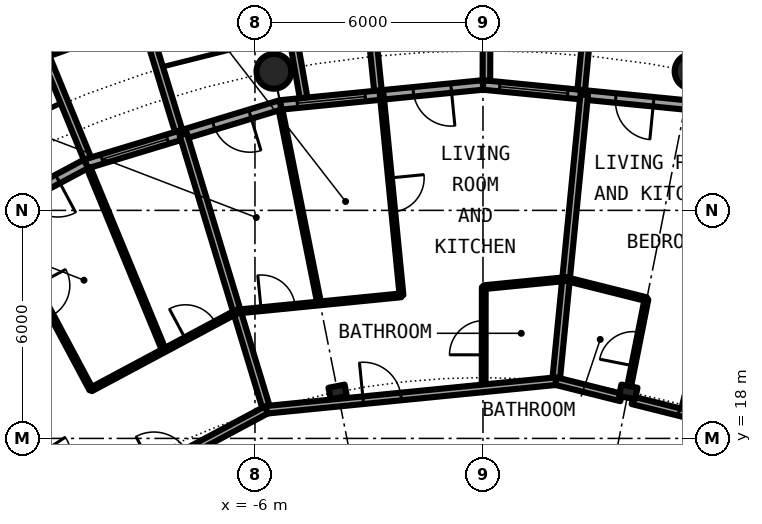
"""IFC4 building model, lengths in metres.
Left out: names, types, materials, properties, quantities, classifications, styles, units other than length and angle.
Written with IfcOpenShell. Run it as: python <this file> out.ifc"""

import sys

from ifc_helpers import new_model, si_unit, direction, frame, frame_2d, origin, origin_2d, place, context, subcontext, project, spatial, rectangle, circle, hollow_circle, i_section, extrude, element, fill, save


model = new_model("IFC4")
c1 = context("Model", 3, precision=1e-05, world=origin(), true_north=direction((0.0, 1.0)))
c2 = subcontext(c1, "Body", "Model", "MODEL_VIEW")
j1 = project(units=[si_unit("LENGTHUNIT", "METRE"), si_unit("PLANEANGLEUNIT", "RADIAN")], contexts=[c1])
p1 = place(None, origin())
s1 = spatial("IfcSite", under=j1, at=p1, CompositionType="ELEMENT")
p2 = place(p1, origin())
s2 = spatial("IfcBuilding", under=s1, at=p2, CompositionType="ELEMENT")
p3 = place(p2, frame((0.0, 0.0, 123.85)))
s3 = spatial("IfcBuildingStorey", under=s2, at=p3, CompositionType="ELEMENT", Elevation=123.85)
for number, where, z_axis, x_axis in (
    (1, (5.501, 27.658, 0.0), (0.0, 0.0, 1.0), (1.0, 0.0, 0.0)),
    (2, (-5.501, 27.658, 0.0), (0.0, 0.0, 1.0), (1.0, 0.0, 0.0)),
):
    element("IfcColumn", number, at=place(p3, frame(where, z_axis=z_axis, x_axis=x_axis)), inside=s3, PredefinedType="COLUMN", context=c2, shape_type="SweptSolid", body=[
        extrude(hollow_circle(Radius=0.457, WallThickness=0.04, at=origin_2d()), origin(), (0.0, 0.0, 1.0), 3.05),
    ])
for number, where, z_axis, x_axis in (
    (3, (3.824, 19.223, 0.0), (0.0, 0.0, 1.0), (0.195, 0.981, 0.0)),
    (4, (-3.824, 19.223, 0.0), (0.0, 0.0, 1.0), (-0.195, 0.981, 0.0)),
):
    element("IfcColumn", number, at=place(p3, frame(where, z_axis=z_axis, x_axis=x_axis)), inside=s3, PredefinedType="COLUMN", context=c2, shape_type="SweptSolid", body=[
        extrude(i_section(OverallWidth=0.307, OverallDepth=0.432, WebThickness=0.021, FlangeThickness=0.04, FilletRadius=0.027, at=origin_2d()), origin(), (0.0, 0.0, 1.0), 3.05),
    ])
p4 = place(p3, frame((5.326, 26.775, 0.0), z_axis=(0.0, 0.0, 1.0), x_axis=(-0.995173996315, 0.098126026407, 0.0)))
e5 = element("IfcWall", 5, at=p4, inside=s3, PredefinedType="SOLIDWALL", context=c2, shape_type="SweptSolid", body=[
    extrude(rectangle(XDim=5.352, YDim=0.25, at=frame_2d((2.676, 0.0))), origin(), (0.0, 0.0, 1.0), 2.7),
])
p5 = place(p4, frame((0.841, 0.0, 0.0)))
e6 = element("IfcOpeningElement", 6, at=p5, cuts=e5, PredefinedType="OPENING", context=c2, shape_type="SweptSolid", body=[
    extrude(rectangle(XDim=1.0, YDim=2.2, at=frame_2d((0.5, 1.1))), frame((0.0, 0.135, 0.0), z_axis=(0.0, -1.0, 0.0), x_axis=(1.0, 0.0, 0.0)), (0.0, 0.0, 1.0), 0.27),
])
p6 = place(p4, frame((3.111, 0.0, 0.3)))
e7 = element("IfcOpeningElement", 7, at=p6, cuts=e5, PredefinedType="OPENING", context=c2, shape_type="SweptSolid", body=[
    extrude(rectangle(XDim=1.8, YDim=2.1, at=frame_2d((0.9, 1.05))), frame((0.0, 0.135, 0.0), z_axis=(0.0, -1.0, 0.0), x_axis=(1.0, 0.0, 0.0)), (0.0, 0.0, 1.0), 0.27),
])
p7 = place(p3, frame((2.586, 27.171, -0.03), z_axis=(0.0, 0.0, 1.0), x_axis=(0.094548432284, 0.995520262954, 0.0)))
e8 = element("IfcWall", 8, at=p7, inside=s3, PredefinedType="SOLIDWALL", context=c2, shape_type="SweptSolid", body=[
    extrude(rectangle(XDim=3.006, YDim=0.2, at=frame_2d((1.503, 0.0))), origin(), (0.0, 0.0, 1.0), 2.73),
])
p8 = place(p3, frame((0.09, 27.417, -0.03), z_axis=(0.0, 0.0, 1.0), x_axis=(0.00347308367, 0.999993968827, 0.0)))
e9 = element("IfcWall", 9, at=p8, inside=s3, PredefinedType="SOLIDWALL", context=c2, shape_type="SweptSolid", body=[
    extrude(rectangle(XDim=2.882, YDim=0.2, at=frame_2d((1.441, 0.0))), origin(), (0.0, 0.0, 1.0), 2.73),
])
p9 = place(p3, frame((0.0, 27.3, 0.0), z_axis=(0.0, 0.0, 1.0), x_axis=(-0.995173996315, -0.098126026407, 0.0)))
e10 = element("IfcWall", 10, at=p9, inside=s3, PredefinedType="SOLIDWALL", context=c2, shape_type="SweptSolid", body=[
    extrude(rectangle(XDim=5.352, YDim=0.25, at=frame_2d((2.676, 0.0))), origin(), (0.0, 0.0, 1.0), 2.7),
])
p10 = place(p9, frame((0.841, 0.0, 0.0)))
e11 = element("IfcOpeningElement", 11, at=p10, cuts=e10, PredefinedType="OPENING", context=c2, shape_type="SweptSolid", body=[
    extrude(rectangle(XDim=1.0, YDim=2.2, at=frame_2d((0.5, 1.1))), frame((0.0, 0.135, 0.0), z_axis=(0.0, -1.0, 0.0), x_axis=(1.0, 0.0, 0.0)), (0.0, 0.0, 1.0), 0.27),
])
p11 = place(p9, frame((3.111, 0.0, 0.3)))
e12 = element("IfcOpeningElement", 12, at=p11, cuts=e10, PredefinedType="OPENING", context=c2, shape_type="SweptSolid", body=[
    extrude(rectangle(XDim=1.8, YDim=2.1, at=frame_2d((0.9, 1.05))), frame((0.0, 0.135, 0.0), z_axis=(0.0, -1.0, 0.0), x_axis=(1.0, 0.0, 0.0)), (0.0, 0.0, 1.0), 0.27),
])
p12 = place(p3, frame((-2.764, 27.153, -0.03), z_axis=(0.0, 0.0, 1.0), x_axis=(-0.101505487237, 0.994834979311, 0.0)))
e13 = element("IfcWall", 13, at=p12, inside=s3, PredefinedType="SOLIDWALL", context=c2, shape_type="SweptSolid", body=[
    extrude(rectangle(XDim=3.007, YDim=0.2, at=frame_2d((1.503, 0.0))), origin(), (0.0, 0.0, 1.0), 2.73),
])
p13 = place(p3, frame((-4.72, 26.961, -0.03), z_axis=(0.0, 0.0, 1.0), x_axis=(-0.172463232037, 0.98501595601, 0.0)))
e14 = element("IfcWall", 14, at=p13, inside=s3, PredefinedType="SOLIDWALL", context=c2, shape_type="SweptSolid", body=[
    extrude(rectangle(XDim=2.929, YDim=0.2, at=frame_2d((1.464, 0.0))), origin(), (0.0, 0.0, 1.0), 2.73),
])
p14 = place(p3, frame((-5.326, 26.775, 0.0), z_axis=(0.0, 0.0, 1.0), x_axis=(-0.956965678721, -0.290201119486, 0.0)))
e15 = element("IfcWall", 15, at=p14, inside=s3, PredefinedType="SOLIDWALL", context=c2, shape_type="SweptSolid", body=[
    extrude(rectangle(XDim=5.351, YDim=0.25, at=frame_2d((2.676, 0.0))), origin(), (0.0, 0.0, 1.0), 2.7),
])
p15 = place(p14, frame((0.841, 0.0, 0.0)))
e16 = element("IfcOpeningElement", 16, at=p15, cuts=e15, PredefinedType="OPENING", context=c2, shape_type="SweptSolid", body=[
    extrude(rectangle(XDim=1.0, YDim=2.2, at=frame_2d((0.5, 1.1))), frame((0.0, 0.135, 0.0), z_axis=(0.0, -1.0, 0.0), x_axis=(1.0, 0.0, 0.0)), (0.0, 0.0, 1.0), 0.27),
])
p16 = place(p14, frame((3.111, 0.0, 0.3)))
e17 = element("IfcOpeningElement", 17, at=p16, cuts=e15, PredefinedType="OPENING", context=c2, shape_type="SweptSolid", body=[
    extrude(rectangle(XDim=1.8, YDim=2.1, at=frame_2d((0.9, 1.05))), frame((0.0, 0.135, 0.0), z_axis=(0.0, -1.0, 0.0), x_axis=(1.0, 0.0, 0.0)), (0.0, 0.0, 1.0), 0.27),
])
p17 = place(p3, frame((-8.82, 29.093, -0.03), z_axis=(0.0, 0.0, 1.0), x_axis=(-0.941461077774, -0.337121697664, 0.0)))
e18 = element("IfcWall", 18, at=p17, inside=s3, PredefinedType="SOLIDWALL", context=c2, shape_type="SweptSolid", body=[
    extrude(rectangle(XDim=2.993, YDim=0.2, at=frame_2d((1.497, 0.0))), origin(), (0.0, 0.0, 1.0), 2.73),
])
p18 = place(p17, frame((0.457, 0.0, 0.33)))
e19 = element("IfcOpeningElement", 19, at=p18, cuts=e18, PredefinedType="OPENING", context=c2, shape_type="SweptSolid", body=[
    extrude(circle(Radius=1.04, at=frame_2d((1.04, 1.04))), frame((0.0, 0.11, 0.0), z_axis=(0.0, -1.0, 0.0), x_axis=(1.0, 0.0, 0.0)), (0.0, 0.0, 1.0), 0.22),
])
p19 = place(p3, frame((-8.009, 26.092, -0.03), z_axis=(0.0, 0.0, 1.0), x_axis=(-0.293406695073, 0.955987715029, 0.0)))
e20 = element("IfcWall", 20, at=p19, inside=s3, PredefinedType="SOLIDWALL", context=c2, shape_type="SweptSolid", body=[
    extrude(rectangle(XDim=3.006, YDim=0.2, at=frame_2d((1.503, 0.0))), origin(), (0.0, 0.0, 1.0), 2.73),
])
p20 = place(p3, frame((-10.409, 25.364, -0.03), z_axis=(0.0, 0.0, 1.0), x_axis=(-0.379509886562, 0.925187681501, 0.0)))
e21 = element("IfcWall", 21, at=p20, inside=s3, PredefinedType="SOLIDWALL", context=c2, shape_type="SweptSolid", body=[
    extrude(rectangle(XDim=2.883, YDim=0.2, at=frame_2d((1.441, 0.0))), origin(), (0.0, 0.0, 1.0), 2.73),
])
p21 = place(p3, frame((-10.447, 25.222, 0.0), z_axis=(0.0, 0.0, 1.0), x_axis=(-0.881915646801, -0.471407246368, 0.0)))
e22 = element("IfcWall", 22, at=p21, inside=s3, PredefinedType="SOLIDWALL", context=c2, shape_type="SweptSolid", body=[
    extrude(rectangle(XDim=5.352, YDim=0.25, at=frame_2d((2.676, 0.0))), origin(), (0.0, 0.0, 1.0), 2.7),
])
p22 = place(p21, frame((0.841, 0.0, 0.0)))
e23 = element("IfcOpeningElement", 23, at=p22, cuts=e22, PredefinedType="OPENING", context=c2, shape_type="SweptSolid", body=[
    extrude(rectangle(XDim=1.0, YDim=2.2, at=frame_2d((0.5, 1.1))), frame((0.0, 0.135, 0.0), z_axis=(0.0, -1.0, 0.0), x_axis=(1.0, 0.0, 0.0)), (0.0, 0.0, 1.0), 0.27),
])
p23 = place(p21, frame((3.111, 0.0, 0.3)))
e24 = element("IfcOpeningElement", 24, at=p23, cuts=e22, PredefinedType="OPENING", context=c2, shape_type="SweptSolid", body=[
    extrude(rectangle(XDim=1.8, YDim=2.1, at=frame_2d((0.9, 1.05))), frame((0.0, 0.135, 0.0), z_axis=(0.0, -1.0, 0.0), x_axis=(1.0, 0.0, 0.0)), (0.0, 0.0, 1.0), 0.27),
])
p24 = place(p3, frame((-7.887, 26.005, 0.0), z_axis=(0.0, 0.0, 1.0), x_axis=(0.29005838641, -0.957008951094, 0.0)))
e25 = element("IfcWall", 25, at=p24, inside=s3, PredefinedType="PARTITIONING", context=c2, shape_type="SweptSolid", body=[
    extrude(rectangle(XDim=7.574, YDim=0.2, at=frame_2d((3.787, 0.0))), origin(), (0.0, 0.0, 1.0), 2.7),
])
p25 = place(p3, frame((-12.81, 23.966, 0.0), z_axis=(0.0, 0.0, 1.0), x_axis=(0.47140999111, -0.881914179658, 0.0)))
e26 = element("IfcWall", 26, at=p25, inside=s3, PredefinedType="PARTITIONING", context=c2, shape_type="SweptSolid", body=[
    extrude(rectangle(XDim=5.303, YDim=0.1, at=frame_2d((2.652, 0.0))), origin(), (0.0, 0.0, 1.0), 2.7),
])
p26 = place(p25, frame((2.202, 0.0, 0.0)))
e27 = element("IfcOpeningElement", 27, at=p26, cuts=e26, PredefinedType="OPENING", context=c2, shape_type="SweptSolid", body=[
    extrude(rectangle(XDim=0.9, YDim=2.3, at=frame_2d((0.45, 1.15))), frame((0.0, 0.06, 0.0), z_axis=(0.0, -1.0, 0.0), x_axis=(1.0, 0.0, 0.0)), (0.0, 0.0, 1.0), 0.12),
])
p27 = place(p3, frame((-12.229, 18.264, 0.0), z_axis=(0.0, 0.0, 1.0), x_axis=(0.556469477731, -0.830868052313, 0.0)))
e28 = element("IfcWall", 28, at=p27, inside=s3, PredefinedType="PARTITIONING", context=c2, shape_type="SweptSolid", body=[
    extrude(rectangle(XDim=2.164, YDim=0.1, at=frame_2d((1.082, 0.0))), origin(), (0.0, 0.0, 1.0), 2.7),
])
p28 = place(p27, frame((0.881, 0.0, 0.0)))
e29 = element("IfcOpeningElement", 29, at=p28, cuts=e28, PredefinedType="OPENING", context=c2, shape_type="SweptSolid", body=[
    extrude(rectangle(XDim=0.9, YDim=2.3, at=frame_2d((0.45, 1.15))), frame((0.0, 0.06, 0.0), z_axis=(0.0, -1.0, 0.0), x_axis=(1.0, 0.0, 0.0)), (0.0, 0.0, 1.0), 0.12),
])
p29 = place(p3, frame((-10.375, 25.116, 0.0), z_axis=(0.0, 0.0, 1.0), x_axis=(0.381673756215, -0.924297107978, 0.0)))
e30 = element("IfcWall", 30, at=p29, inside=s3, PredefinedType="PARTITIONING", context=c2, shape_type="SweptSolid", body=[
    extrude(rectangle(XDim=5.195, YDim=0.1, at=frame_2d((2.598, 0.0))), origin(), (0.0, 0.0, 1.0), 2.7),
])
p30 = place(p3, frame((-5.327, 26.648, 0.0), z_axis=(0.0, 0.0, 1.0), x_axis=(0.195899255693, -0.980624026638, 0.0)))
e31 = element("IfcWall", 31, at=p30, inside=s3, PredefinedType="PARTITIONING", context=c2, shape_type="SweptSolid", body=[
    extrude(rectangle(XDim=5.196, YDim=0.1, at=frame_2d((2.598, 0.0))), origin(), (0.0, 0.0, 1.0), 2.7),
])
p31 = place(p3, frame((-2.664, 27.044, 0.0), z_axis=(0.0, 0.0, 1.0), x_axis=(0.098054199821, -0.995181075934, 0.0)))
e32 = element("IfcWall", 32, at=p31, inside=s3, PredefinedType="PARTITIONING", context=c2, shape_type="SweptSolid", body=[
    extrude(rectangle(XDim=5.303, YDim=0.1, at=frame_2d((2.652, 0.0))), origin(), (0.0, 0.0, 1.0), 2.7),
])
p32 = place(p31, frame((2.202, 0.0, 0.0)))
e33 = element("IfcOpeningElement", 33, at=p32, cuts=e32, PredefinedType="OPENING", context=c2, shape_type="SweptSolid", body=[
    extrude(rectangle(XDim=0.9, YDim=2.3, at=frame_2d((0.45, 1.15))), frame((0.0, 0.06, 0.0), z_axis=(0.0, -1.0, 0.0), x_axis=(1.0, 0.0, 0.0)), (0.0, 0.0, 1.0), 0.12),
])
p33 = place(p3, frame((0.018, 19.318, 0.0), z_axis=(0.0, 0.0, 1.0), x_axis=(0.001101017775, 0.99999939388, 0.0)))
e34 = element("IfcWall", 34, at=p33, inside=s3, PredefinedType="PARTITIONING", context=c2, shape_type="SweptSolid", body=[
    extrude(rectangle(XDim=2.661, YDim=0.1, at=frame_2d((1.331, 0.0))), origin(), (0.0, 0.0, 1.0), 2.7),
])
p34 = place(p33, frame((0.881, 0.0, 0.0)))
e35 = element("IfcOpeningElement", 35, at=p34, cuts=e34, PredefinedType="OPENING", context=c2, shape_type="SweptSolid", body=[
    extrude(rectangle(XDim=0.9, YDim=2.3, at=frame_2d((0.45, 1.15))), frame((0.0, 0.06, 0.0), z_axis=(0.0, -1.0, 0.0), x_axis=(1.0, 0.0, 0.0)), (0.0, 0.0, 1.0), 0.12),
])
p35 = place(p3, frame((1.921, 19.506, 0.0), z_axis=(0.0, 0.0, 1.0), x_axis=(0.098115395479, 0.995175044487, 0.0)))
e36 = element("IfcWall", 36, at=p35, inside=s3, PredefinedType="PARTITIONING", context=c2, shape_type="SweptSolid", body=[
    extrude(rectangle(XDim=7.574, YDim=0.2, at=frame_2d((3.787, 0.0))), origin(), (0.0, 0.0, 1.0), 2.7),
])
p36 = place(p3, frame((3.86, 19.436, 0.0), z_axis=(0.0, 0.0, 1.0), x_axis=(0.194627049372, 0.98087731733, 0.0)))
e37 = element("IfcWall", 37, at=p36, inside=s3, PredefinedType="PARTITIONING", context=c2, shape_type="SweptSolid", body=[
    extrude(rectangle(XDim=2.271, YDim=0.1, at=frame_2d((1.135, 0.0))), origin(), (0.0, 0.0, 1.0), 2.7),
])
p37 = place(p36, frame((0.483, 0.0, 0.0)))
e38 = element("IfcOpeningElement", 38, at=p37, cuts=e37, PredefinedType="OPENING", context=c2, shape_type="SweptSolid", body=[
    extrude(rectangle(XDim=0.9, YDim=2.3, at=frame_2d((0.45, 1.15))), frame((0.0, 0.06, 0.0), z_axis=(0.0, -1.0, 0.0), x_axis=(1.0, 0.0, 0.0)), (0.0, 0.0, 1.0), 0.12),
])
p38 = place(p3, frame((-12.434, 15.151, 0.0), z_axis=(0.0, 0.0, 1.0), x_axis=(0.8819312112, 0.471378127104, 0.0)))
e39 = element("IfcWall", 39, at=p38, inside=s3, PredefinedType="PARTITIONING", context=c2, shape_type="SweptSolid", body=[
    extrude(rectangle(XDim=7.65, YDim=0.2, at=frame_2d((3.825, 0.0))), origin(), (0.0, 0.0, 1.0), 2.39),
])
p39 = place(p38, frame((4.279, 0.0, 0.0)))
e40 = element("IfcOpeningElement", 40, at=p39, cuts=e39, PredefinedType="OPENING", context=c2, shape_type="SweptSolid", body=[
    extrude(rectangle(XDim=1.0, YDim=2.3, at=frame_2d((0.5, 1.15))), frame((0.0, 0.11, 0.0), z_axis=(0.0, -1.0, 0.0), x_axis=(1.0, 0.0, 0.0)), (0.0, 0.0, 1.0), 0.22),
])
p40 = place(p3, frame((-5.696, 18.753, 0.0), z_axis=(0.0, 0.0, 1.0), x_axis=(0.995146797279, 0.098401483048, 0.0)))
e41 = element("IfcWall", 41, at=p40, inside=s3, PredefinedType="PARTITIONING", context=c2, shape_type="SweptSolid", body=[
    extrude(rectangle(XDim=7.654, YDim=0.2, at=frame_2d((3.827, 0.0))), origin(), (0.0, 0.0, 1.0), 2.39),
])
p41 = place(p40, frame((2.556, 0.0, 0.0)))
e42 = element("IfcOpeningElement", 42, at=p41, cuts=e41, PredefinedType="OPENING", context=c2, shape_type="SweptSolid", body=[
    extrude(rectangle(XDim=1.0, YDim=2.3, at=frame_2d((0.5, 1.15))), frame((0.0, 0.11, 0.0), z_axis=(0.0, -1.0, 0.0), x_axis=(1.0, 0.0, 0.0)), (0.0, 0.0, 1.0), 0.22),
])
p42 = place(p3, frame((1.921, 19.506, 0.0), z_axis=(0.0, 0.0, 1.0), x_axis=(0.97002068022, -0.243022385689, 0.0)))
e43 = element("IfcWall", 43, at=p42, inside=s3, PredefinedType="PARTITIONING", context=c2, shape_type="SweptSolid", body=[
    extrude(rectangle(XDim=1.77, YDim=0.2, at=frame_2d((0.885, 0.0))), origin(), (0.0, 0.0, 1.0), 2.39),
])
p43 = place(p3, frame((3.936, 19.001, 0.0), z_axis=(0.0, 0.0, 1.0), x_axis=(0.970025155677, -0.243004521262, 0.0)))
e44 = element("IfcWall", 44, at=p43, inside=s3, PredefinedType="PARTITIONING", context=c2, shape_type="SweptSolid", body=[
    extrude(rectangle(XDim=3.675, YDim=0.2, at=frame_2d((1.837, 0.0))), origin(), (0.0, 0.0, 1.0), 2.39),
])
p44 = place(p43, frame((1.258, 0.0, 0.0)))
e45 = element("IfcOpeningElement", 45, at=p44, cuts=e44, PredefinedType="OPENING", context=c2, shape_type="SweptSolid", body=[
    extrude(rectangle(XDim=1.0, YDim=2.3, at=frame_2d((0.5, 1.15))), frame((0.0, 0.11, 0.0), z_axis=(0.0, -1.0, 0.0), x_axis=(1.0, 0.0, 0.0)), (0.0, 0.0, 1.0), 0.22),
])
p45 = place(p3, frame((-10.312, 19.288, 0.0), z_axis=(0.0, 0.0, 1.0), x_axis=(0.881932070463, 0.471376519451, 0.0)))
e46 = element("IfcWall", 46, at=p45, inside=s3, PredefinedType="PARTITIONING", context=c2, shape_type="SweptSolid", body=[
    extrude(rectangle(XDim=4.355, YDim=0.1, at=frame_2d((2.178, 0.0))), origin(), (0.0, 0.0, 1.0), 2.7),
])
p46 = place(p45, frame((2.816, 0.0, 0.0)))
e47 = element("IfcOpeningElement", 47, at=p46, cuts=e46, PredefinedType="OPENING", context=c2, shape_type="SweptSolid", body=[
    extrude(rectangle(XDim=0.9, YDim=2.3, at=frame_2d((0.45, 1.15))), frame((0.0, 0.06, 0.0), z_axis=(0.0, -1.0, 0.0), x_axis=(1.0, 0.0, 0.0)), (0.0, 0.0, 1.0), 0.12),
])
p47 = place(p3, frame((-6.482, 21.336, 0.0), z_axis=(0.0, 0.0, 1.0), x_axis=(0.995148257168, 0.098386717885, 0.0)))
e48 = element("IfcWall", 48, at=p47, inside=s3, PredefinedType="PARTITIONING", context=c2, shape_type="SweptSolid", body=[
    extrude(rectangle(XDim=4.35, YDim=0.1, at=frame_2d((2.175, 0.0))), origin(), (0.0, 0.0, 1.0), 2.7),
])
p48 = place(p47, frame((0.647, 0.0, 0.0)))
e49 = element("IfcOpeningElement", 49, at=p48, cuts=e48, PredefinedType="OPENING", context=c2, shape_type="SweptSolid", body=[
    extrude(rectangle(XDim=0.9, YDim=2.3, at=frame_2d((0.45, 1.15))), frame((0.0, 0.06, 0.0), z_axis=(0.0, -1.0, 0.0), x_axis=(1.0, 0.0, 0.0)), (0.0, 0.0, 1.0), 0.12),
])
p49 = place(p3, frame((0.021, 21.979, 0.0), z_axis=(0.0, 0.0, 1.0), x_axis=(0.995145478845, 0.098414815623, 0.0)))
e50 = element("IfcWall", 50, at=p49, inside=s3, PredefinedType="PARTITIONING", context=c2, shape_type="SweptSolid", body=[
    extrude(rectangle(XDim=2.176, YDim=0.1, at=frame_2d((1.088, 0.0))), origin(), (0.0, 0.0, 1.0), 2.7),
])
p50 = place(p3, frame((2.186, 22.193, 0.0), z_axis=(0.0, 0.0, 1.0), x_axis=(0.97003047456, -0.242983288366, 0.0)))
e51 = element("IfcWall", 51, at=p50, inside=s3, PredefinedType="PARTITIONING", context=c2, shape_type="SweptSolid", body=[
    extrude(rectangle(XDim=2.181, YDim=0.1, at=frame_2d((1.091, 0.0))), origin(), (0.0, 0.0, 1.0), 2.7),
])
p51 = place(p5, origin())
e52 = element("IfcDoor", 52, at=p51, inside=s3, OperationType="SINGLE_SWING_LEFT", PredefinedType="DOOR", context=c2, shape_type="SweptSolid", body=[
    extrude(rectangle(XDim=1.0, YDim=2.2, at=frame_2d((0.5, 1.1))), frame((0.0, 0.025, 0.0), z_axis=(0.0, -1.0, 0.0), x_axis=(1.0, 0.0, 0.0)), (0.0, 0.0, 1.0), 0.05),
])
fill(e6, e52)
p52 = place(p6, origin())
e53 = element("IfcWindow", 53, at=p52, inside=s3, PartitioningType="SINGLE_PANEL", PredefinedType="WINDOW", context=c2, shape_type="SweptSolid", body=[
    extrude(rectangle(XDim=1.8, YDim=2.1, at=frame_2d((0.9, 1.05))), frame((0.0, 0.03, 0.0), z_axis=(0.0, -1.0, 0.0), x_axis=(1.0, 0.0, 0.0)), (0.0, 0.0, 1.0), 0.06),
])
fill(e7, e53)
p53 = place(p10, origin())
e54 = element("IfcDoor", 54, at=p53, inside=s3, OperationType="SINGLE_SWING_LEFT", PredefinedType="DOOR", context=c2, shape_type="SweptSolid", body=[
    extrude(rectangle(XDim=1.0, YDim=2.2, at=frame_2d((0.5, 1.1))), frame((0.0, 0.025, 0.0), z_axis=(0.0, -1.0, 0.0), x_axis=(1.0, 0.0, 0.0)), (0.0, 0.0, 1.0), 0.05),
])
fill(e11, e54)
p54 = place(p11, origin())
e55 = element("IfcWindow", 55, at=p54, inside=s3, PartitioningType="SINGLE_PANEL", PredefinedType="WINDOW", context=c2, shape_type="SweptSolid", body=[
    extrude(rectangle(XDim=1.8, YDim=2.1, at=frame_2d((0.9, 1.05))), frame((0.0, 0.03, 0.0), z_axis=(0.0, -1.0, 0.0), x_axis=(1.0, 0.0, 0.0)), (0.0, 0.0, 1.0), 0.06),
])
fill(e12, e55)
p55 = place(p15, origin())
e56 = element("IfcDoor", 56, at=p55, inside=s3, OperationType="SINGLE_SWING_LEFT", PredefinedType="DOOR", context=c2, shape_type="SweptSolid", body=[
    extrude(rectangle(XDim=1.0, YDim=2.2, at=frame_2d((0.5, 1.1))), frame((0.0, 0.025, 0.0), z_axis=(0.0, -1.0, 0.0), x_axis=(1.0, 0.0, 0.0)), (0.0, 0.0, 1.0), 0.05),
])
fill(e16, e56)
p56 = place(p16, origin())
e57 = element("IfcWindow", 57, at=p56, inside=s3, PartitioningType="SINGLE_PANEL", PredefinedType="WINDOW", context=c2, shape_type="SweptSolid", body=[
    extrude(rectangle(XDim=1.8, YDim=2.1, at=frame_2d((0.9, 1.05))), frame((0.0, 0.03, 0.0), z_axis=(0.0, -1.0, 0.0), x_axis=(1.0, 0.0, 0.0)), (0.0, 0.0, 1.0), 0.06),
])
fill(e17, e57)
p57 = place(p22, origin())
e58 = element("IfcDoor", 58, at=p57, inside=s3, OperationType="SINGLE_SWING_LEFT", PredefinedType="DOOR", context=c2, shape_type="SweptSolid", body=[
    extrude(rectangle(XDim=1.0, YDim=2.2, at=frame_2d((0.5, 1.1))), frame((0.0, 0.025, 0.0), z_axis=(0.0, -1.0, 0.0), x_axis=(1.0, 0.0, 0.0)), (0.0, 0.0, 1.0), 0.05),
])
fill(e23, e58)
p58 = place(p44, origin())
e59 = element("IfcDoor", 59, at=p58, inside=s3, OperationType="SINGLE_SWING_LEFT", PredefinedType="DOOR", context=c2, shape_type="SweptSolid", body=[
    extrude(rectangle(XDim=1.0, YDim=2.3, at=frame_2d((0.5, 1.15))), frame((0.0, 0.025, 0.0), z_axis=(0.0, -1.0, 0.0), x_axis=(1.0, 0.0, 0.0)), (0.0, 0.0, 1.0), 0.05),
])
fill(e45, e59)
p59 = place(p37, origin())
e60 = element("IfcDoor", 60, at=p59, inside=s3, OperationType="SINGLE_SWING_LEFT", PredefinedType="DOOR", context=c2, shape_type="SweptSolid", body=[
    extrude(rectangle(XDim=0.9, YDim=2.3, at=frame_2d((0.45, 1.15))), frame((0.0, 0.025, 0.0), z_axis=(0.0, -1.0, 0.0), x_axis=(1.0, 0.0, 0.0)), (0.0, 0.0, 1.0), 0.05),
])
fill(e38, e60)
p60 = place(p41, origin())
e61 = element("IfcDoor", 61, at=p60, inside=s3, OperationType="SINGLE_SWING_LEFT", PredefinedType="DOOR", context=c2, shape_type="SweptSolid", body=[
    extrude(rectangle(XDim=1.0, YDim=2.3, at=frame_2d((0.5, 1.15))), frame((0.0, 0.025, 0.0), z_axis=(0.0, -1.0, 0.0), x_axis=(1.0, 0.0, 0.0)), (0.0, 0.0, 1.0), 0.05),
])
fill(e42, e61)
p61 = place(p34, origin())
e62 = element("IfcDoor", 62, at=p61, inside=s3, OperationType="SINGLE_SWING_LEFT", PredefinedType="DOOR", context=c2, shape_type="SweptSolid", body=[
    extrude(rectangle(XDim=0.9, YDim=2.3, at=frame_2d((0.45, 1.15))), frame((0.0, 0.025, 0.0), z_axis=(0.0, -1.0, 0.0), x_axis=(1.0, 0.0, 0.0)), (0.0, 0.0, 1.0), 0.05),
])
fill(e35, e62)
p62 = place(p32, origin())
e63 = element("IfcDoor", 63, at=p62, inside=s3, OperationType="SINGLE_SWING_RIGHT", PredefinedType="DOOR", context=c2, shape_type="SweptSolid", body=[
    extrude(rectangle(XDim=0.9, YDim=2.3, at=frame_2d((0.45, 1.15))), frame((0.0, 0.025, 0.0), z_axis=(0.0, -1.0, 0.0), x_axis=(1.0, 0.0, 0.0)), (0.0, 0.0, 1.0), 0.05),
])
fill(e33, e63)
p63 = place(p48, origin())
e64 = element("IfcDoor", 64, at=p63, inside=s3, OperationType="SINGLE_SWING_LEFT", PredefinedType="DOOR", context=c2, shape_type="SweptSolid", body=[
    extrude(rectangle(XDim=0.9, YDim=2.3, at=frame_2d((0.45, 1.15))), frame((0.0, 0.025, 0.0), z_axis=(0.0, -1.0, 0.0), x_axis=(1.0, 0.0, 0.0)), (0.0, 0.0, 1.0), 0.05),
])
fill(e49, e64)
p64 = place(p26, origin())
e65 = element("IfcDoor", 65, at=p64, inside=s3, OperationType="SINGLE_SWING_RIGHT", PredefinedType="DOOR", context=c2, shape_type="SweptSolid", body=[
    extrude(rectangle(XDim=0.9, YDim=2.3, at=frame_2d((0.45, 1.15))), frame((0.0, 0.025, 0.0), z_axis=(0.0, -1.0, 0.0), x_axis=(1.0, 0.0, 0.0)), (0.0, 0.0, 1.0), 0.05),
])
fill(e27, e65)
p65 = place(p46, origin())
e66 = element("IfcDoor", 66, at=p65, inside=s3, OperationType="SINGLE_SWING_RIGHT", PredefinedType="DOOR", context=c2, shape_type="SweptSolid", body=[
    extrude(rectangle(XDim=0.9, YDim=2.3, at=frame_2d((0.45, 1.15))), frame((0.0, 0.025, 0.0), z_axis=(0.0, -1.0, 0.0), x_axis=(1.0, 0.0, 0.0)), (0.0, 0.0, 1.0), 0.05),
])
fill(e47, e66)
save(model, sys.argv[1])
